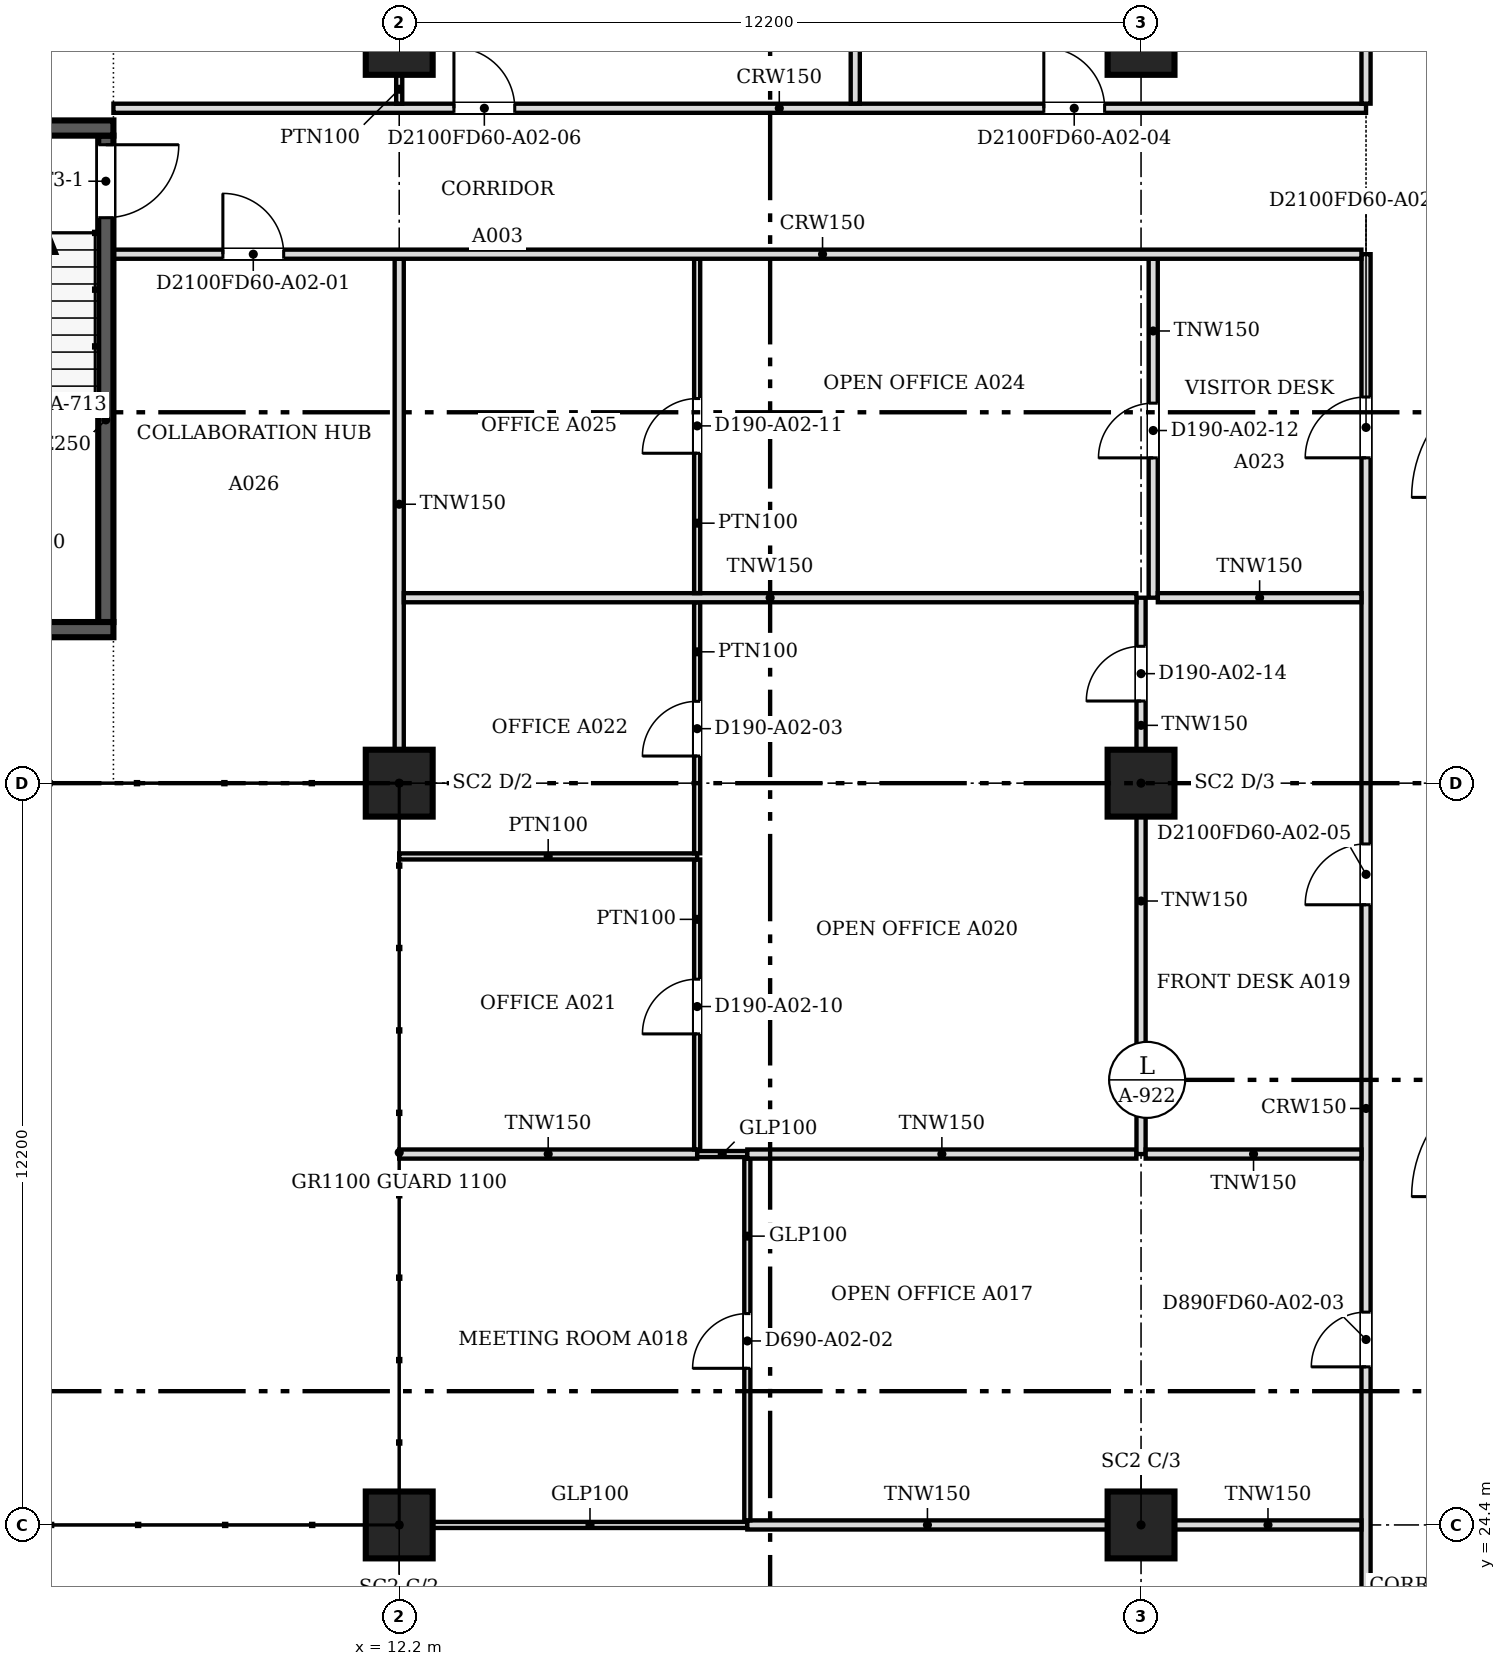
"""IFC4 building model, lengths in metres.
Left out: names, types, materials, properties, quantities, classifications, styles, units other than length and angle.
Written with IfcOpenShell. Run it as: python <this file> out.ifc"""

import sys

from ifc_helpers import new_model, si_unit, direction, frame, frame_2d, origin, origin_2d, place, context, subcontext, project, spatial, rectangle, extrude, source, transform, mapped, element, fill, save


model = new_model("IFC4")
c1 = context("Model", 3, precision=1e-05, world=origin(), true_north=direction((0.0, 1.0)))
c2 = subcontext(c1, "Body", "Model", "MODEL_VIEW")
j1 = project(units=[si_unit("LENGTHUNIT", "METRE"), si_unit("PLANEANGLEUNIT", "RADIAN")], contexts=[c1])
p1 = place(None, origin())
s1 = spatial("IfcSite", under=j1, at=p1, CompositionType="ELEMENT")
p2 = place(p1, origin())
s2 = spatial("IfcBuilding", under=s1, at=p2, CompositionType="ELEMENT")
p3 = place(p2, frame((0.0, 0.0, 33.4)))
s3 = spatial("IfcBuildingStorey", under=s2, at=p3, CompositionType="ELEMENT", Elevation=33.4)
for number, where, z_axis, x_axis in (
    (1, (12.2, 24.4, 0.0), (0.0, 0.0, 1.0), (1.0, 0.0, 0.0)),
    (2, (12.2, 36.6, 0.0), (0.0, 0.0, 1.0), (1.0, 0.0, 0.0)),
    (3, (12.2, 48.8, 0.0), (0.0, 0.0, 1.0), (1.0, 0.0, 0.0)),
    (4, (24.4, 24.4, 0.0), (0.0, 0.0, 1.0), (1.0, 0.0, 0.0)),
    (5, (24.4, 36.6, 0.0), (0.0, 0.0, 1.0), (1.0, 0.0, 0.0)),
    (6, (24.4, 48.8, 0.0), (0.0, 0.0, 1.0), (1.0, 0.0, 0.0)),
):
    element("IfcColumn", number, at=place(p3, frame(where, z_axis=z_axis, x_axis=x_axis)), inside=s3, PredefinedType="COLUMN", context=c2, shape_type="SweptSolid", body=[
        extrude(rectangle(XDim=1.1, YDim=1.1, at=origin_2d()), origin(), (0.0, 0.0, 1.0), 3.6),
    ])
for number, where, z_axis, x_axis in (
    (7, (7.5, 39.125, 0.0), (0.0, 0.0, 1.0), (-1.0, 0.0, 0.0)),
    (8, (3.6, 47.375, 0.0), (0.0, 0.0, 1.0), (1.0, 0.0, 0.0)),
):
    element("IfcWall", number, at=place(p3, frame(where, z_axis=z_axis, x_axis=x_axis)), inside=s3, PredefinedType="SOLIDWALL", context=c2, shape_type="SweptSolid", body=[
        extrude(rectangle(XDim=3.9, YDim=0.25, at=frame_2d((1.95, 0.0))), origin(), (0.0, 0.0, 1.0), 3.8),
    ])
p4 = place(p3, frame((7.375, 47.25, 0.0), z_axis=(0.0, 0.0, 1.0), x_axis=(0.0, -1.0, 0.0)))
e9 = element("IfcWall", 9, at=p4, inside=s3, PredefinedType="SOLIDWALL", context=c2, shape_type="SweptSolid", body=[
    extrude(rectangle(XDim=8.0, YDim=0.25, at=frame_2d((4.0, 0.0))), origin(), (0.0, 0.0, 1.0), 3.8),
])
m1 = source(origin(), c2, "Body", "SweptSolid", [
    extrude(rectangle(XDim=1.2, YDim=2.1, at=frame_2d((0.6, 1.05))), frame((0.0, 0.135, 0.0), z_axis=(0.0, -1.0, 0.0), x_axis=(1.0, 0.0, 0.0)), (0.0, 0.0, 1.0), 0.27),
])
p5 = place(p4, frame((0.15, 0.0, 0.0)))
e10 = element("IfcOpeningElement", 10, at=p5, cuts=e9, PredefinedType="OPENING", context=c2, shape_type="MappedRepresentation", body=[
    mapped(m1, transform((0.0, 0.0, 0.0), scale=1.0)),
])
p6 = place(p3, frame((28.1, 18.8, 0.0), z_axis=(0.0, 0.0, 1.0), x_axis=(0.0, 1.0, 0.0)))
e11 = element("IfcWall", 11, at=p6, inside=s3, PredefinedType="PARTITIONING", context=c2, shape_type="SweptSolid", body=[
    extrude(rectangle(XDim=26.5, YDim=0.15, at=frame_2d((13.25, 0.0))), origin(), (0.0, 0.0, 1.0), 3.067),
])
m2 = source(origin(), c2, "Body", "SweptSolid", [
    extrude(rectangle(XDim=0.9, YDim=2.1, at=frame_2d((0.45, 1.05))), frame((0.0, 0.085, 0.0), z_axis=(0.0, -1.0, 0.0), x_axis=(1.0, 0.0, 0.0)), (0.0, 0.0, 1.0), 0.17),
])
p7 = place(p6, frame((1.1, 0.0, 0.0)))
e12 = element("IfcOpeningElement", 12, at=p7, cuts=e11, PredefinedType="OPENING", context=c2, shape_type="MappedRepresentation", body=[
    mapped(m2, transform((0.0, 0.0, 0.0), scale=1.0)),
])
m3 = source(origin(), c2, "Body", "SweptSolid", [
    extrude(rectangle(XDim=1.0, YDim=2.1, at=frame_2d((0.5, 1.05))), frame((0.0, 0.085, 0.0), z_axis=(0.0, -1.0, 0.0), x_axis=(1.0, 0.0, 0.0)), (0.0, 0.0, 1.0), 0.17),
])
p8 = place(p6, frame((23.151, 0.0, 0.0)))
e13 = element("IfcOpeningElement", 13, at=p8, cuts=e11, PredefinedType="OPENING", context=c2, shape_type="MappedRepresentation", body=[
    mapped(m3, transform((0.0, 0.0, 0.0), scale=1.0)),
])
p9 = place(p6, frame((8.2, 0.0, 0.0)))
e14 = element("IfcOpeningElement", 14, at=p9, cuts=e11, PredefinedType="OPENING", context=c2, shape_type="MappedRepresentation", body=[
    mapped(m2, transform((0.0, 0.0, 0.0), scale=1.0)),
])
p10 = place(p6, frame((15.8, 0.0, 0.0)))
e15 = element("IfcOpeningElement", 15, at=p10, cuts=e11, PredefinedType="OPENING", context=c2, shape_type="MappedRepresentation", body=[
    mapped(m3, transform((0.0, 0.0, 0.0), scale=1.0)),
])
p11 = place(p3, frame((12.751, 24.4, 0.0), z_axis=(0.0, 0.0, 1.0), x_axis=(1.0, 0.0, 0.0)))
e16 = element("IfcWall", 16, at=p11, inside=s3, PredefinedType="PARTITIONING", context=c2, shape_type="SweptSolid", body=[
    extrude(rectangle(XDim=5.173, YDim=0.1, at=frame_2d((2.586, 0.0))), origin(), (0.0, 0.0, 1.0), 3.067),
])
p12 = place(p3, frame((17.925, 24.4, 0.0), z_axis=(0.0, 0.0, 1.0), x_axis=(1.0, 0.0, 0.0)))
e17 = element("IfcWall", 17, at=p12, inside=s3, PredefinedType="PARTITIONING", context=c2, shape_type="SweptSolid", body=[
    extrude(rectangle(XDim=5.924, YDim=0.15, at=frame_2d((2.962, 0.0))), origin(), (0.0, 0.0, 1.0), 3.067),
])
p13 = place(p3, frame((24.951, 24.4, 0.0), z_axis=(0.0, 0.0, 1.0), x_axis=(1.0, 0.0, 0.0)))
e18 = element("IfcWall", 18, at=p13, inside=s3, PredefinedType="PARTITIONING", context=c2, shape_type="SweptSolid", body=[
    extrude(rectangle(XDim=3.073, YDim=0.15, at=frame_2d((1.537, 0.0))), origin(), (0.0, 0.0, 1.0), 3.067),
])
p14 = place(p3, frame((17.925, 24.476, 0.0), z_axis=(0.0, 0.0, 1.0), x_axis=(0.0, 1.0, 0.0)))
e19 = element("IfcWall", 19, at=p14, inside=s3, PredefinedType="PARTITIONING", context=c2, shape_type="SweptSolid", body=[
    extrude(rectangle(XDim=5.948, YDim=0.1, at=frame_2d((2.974, 0.0))), origin(), (0.0, 0.0, 1.0), 3.067),
])
m4 = source(origin(), c2, "Body", "SweptSolid", [
    extrude(rectangle(XDim=0.9, YDim=2.1, at=frame_2d((0.45, 1.05))), frame((0.0, 0.06, 0.0), z_axis=(0.0, -1.0, 0.0), x_axis=(1.0, 0.0, 0.0)), (0.0, 0.0, 1.0), 0.12),
])
p15 = place(p14, frame((2.5, 0.0, 0.0)))
e20 = element("IfcOpeningElement", 20, at=p15, cuts=e19, PredefinedType="OPENING", context=c2, shape_type="MappedRepresentation", body=[
    mapped(m4, transform((0.0, 0.0, 0.0), scale=1.0)),
])
p16 = place(p3, frame((12.2, 30.5, 0.0), z_axis=(0.0, 0.0, 1.0), x_axis=(1.0, 0.0, 0.0)))
e21 = element("IfcWall", 21, at=p16, inside=s3, PredefinedType="PARTITIONING", context=c2, shape_type="SweptSolid", body=[
    extrude(rectangle(XDim=4.9, YDim=0.15, at=frame_2d((2.45, 0.0))), origin(), (0.0, 0.0, 1.0), 3.067),
])
p17 = place(p3, frame((17.101, 30.5, 0.0), z_axis=(0.0, 0.0, 1.0), x_axis=(1.0, 0.0, 0.0)))
e22 = element("IfcWall", 22, at=p17, inside=s3, PredefinedType="PARTITIONING", context=c2, shape_type="SweptSolid", body=[
    extrude(rectangle(XDim=0.823, YDim=0.1, at=frame_2d((0.412, 0.0))), origin(), (0.0, 0.0, 1.0), 3.067),
])
p18 = place(p3, frame((17.925, 30.5, 0.0), z_axis=(0.0, 0.0, 1.0), x_axis=(1.0, 0.0, 0.0)))
e23 = element("IfcWall", 23, at=p18, inside=s3, PredefinedType="PARTITIONING", context=c2, shape_type="SweptSolid", body=[
    extrude(rectangle(XDim=6.399, YDim=0.15, at=frame_2d((3.199, 0.0))), origin(), (0.0, 0.0, 1.0), 3.067),
])
p19 = place(p3, frame((24.4, 30.5, 0.0), z_axis=(0.0, 0.0, 1.0), x_axis=(0.0, 1.0, 0.0)))
e24 = element("IfcWall", 24, at=p19, inside=s3, PredefinedType="PARTITIONING", context=c2, shape_type="SweptSolid", body=[
    extrude(rectangle(XDim=5.549, YDim=0.15, at=frame_2d((2.774, 0.0))), origin(), (0.0, 0.0, 1.0), 3.067),
])
p20 = place(p3, frame((24.476, 30.5, 0.0), z_axis=(0.0, 0.0, 1.0), x_axis=(1.0, 0.0, 0.0)))
e25 = element("IfcWall", 25, at=p20, inside=s3, PredefinedType="PARTITIONING", context=c2, shape_type="SweptSolid", body=[
    extrude(rectangle(XDim=3.548, YDim=0.15, at=frame_2d((1.774, 0.0))), origin(), (0.0, 0.0, 1.0), 3.067),
])
p21 = place(p3, frame((17.1, 30.576, 0.0), z_axis=(0.0, 0.0, 1.0), x_axis=(0.0, 1.0, 0.0)))
e26 = element("IfcWall", 26, at=p21, inside=s3, PredefinedType="PARTITIONING", context=c2, shape_type="SweptSolid", body=[
    extrude(rectangle(XDim=4.768, YDim=0.1, at=frame_2d((2.384, 0.0))), origin(), (0.0, 0.0, 1.0), 3.067),
])
p22 = place(p21, frame((1.9, 0.0, 0.0)))
e27 = element("IfcOpeningElement", 27, at=p22, cuts=e26, PredefinedType="OPENING", context=c2, shape_type="MappedRepresentation", body=[
    mapped(m4, transform((0.0, 0.0, 0.0), scale=1.0)),
])
p23 = place(p3, frame((12.2, 35.395, 0.0), z_axis=(0.0, 0.0, 1.0), x_axis=(1.0, 0.0, 0.0)))
e28 = element("IfcWall", 28, at=p23, inside=s3, PredefinedType="PARTITIONING", context=c2, shape_type="SweptSolid", body=[
    extrude(rectangle(XDim=4.9, YDim=0.1, at=frame_2d((2.45, 0.0))), origin(), (0.0, 0.0, 1.0), 3.067),
])
p24 = place(p3, frame((17.1, 35.446, 0.0), z_axis=(0.0, 0.0, 1.0), x_axis=(0.0, 1.0, 0.0)))
e29 = element("IfcWall", 29, at=p24, inside=s3, PredefinedType="PARTITIONING", context=c2, shape_type="SweptSolid", body=[
    extrude(rectangle(XDim=4.128, YDim=0.1, at=frame_2d((2.064, 0.0))), origin(), (0.0, 0.0, 1.0), 3.067),
])
p25 = place(p24, frame((1.6, 0.0, 0.0)))
e30 = element("IfcOpeningElement", 30, at=p25, cuts=e29, PredefinedType="OPENING", context=c2, shape_type="MappedRepresentation", body=[
    mapped(m4, transform((0.0, 0.0, 0.0), scale=1.0)),
])
p26 = place(p3, frame((12.2, 37.151, 0.0), z_axis=(0.0, 0.0, 1.0), x_axis=(0.0, 1.0, 0.0)))
e31 = element("IfcWall", 31, at=p26, inside=s3, PredefinedType="PARTITIONING", context=c2, shape_type="SweptSolid", body=[
    extrude(rectangle(XDim=8.073, YDim=0.15, at=frame_2d((4.037, 0.0))), origin(), (0.0, 0.0, 1.0), 3.067),
])
p27 = place(p3, frame((24.4, 37.151, 0.0), z_axis=(0.0, 0.0, 1.0), x_axis=(0.0, 1.0, 0.0)))
e32 = element("IfcWall", 32, at=p27, inside=s3, PredefinedType="PARTITIONING", context=c2, shape_type="SweptSolid", body=[
    extrude(rectangle(XDim=2.499, YDim=0.15, at=frame_2d((1.25, 0.0))), origin(), (0.0, 0.0, 1.0), 3.067),
])
p28 = place(p27, frame((0.8, 0.0, 0.0)))
e33 = element("IfcOpeningElement", 33, at=p28, cuts=e32, PredefinedType="OPENING", context=c2, shape_type="MappedRepresentation", body=[
    mapped(m2, transform((0.0, 0.0, 0.0), scale=1.0)),
])
p29 = place(p3, frame((12.276, 39.65, 0.0), z_axis=(0.0, 0.0, 1.0), x_axis=(1.0, 0.0, 0.0)))
e34 = element("IfcWall", 34, at=p29, inside=s3, PredefinedType="PARTITIONING", context=c2, shape_type="SweptSolid", body=[
    extrude(rectangle(XDim=12.048, YDim=0.15, at=frame_2d((6.024, 0.0))), origin(), (0.0, 0.0, 1.0), 3.067),
])
p30 = place(p3, frame((24.6, 39.65, 0.0), z_axis=(0.0, 0.0, 1.0), x_axis=(0.0, 1.0, 0.0)))
e35 = element("IfcWall", 35, at=p30, inside=s3, PredefinedType="PARTITIONING", context=c2, shape_type="SweptSolid", body=[
    extrude(rectangle(XDim=5.574, YDim=0.15, at=frame_2d((2.787, 0.0))), origin(), (0.0, 0.0, 1.0), 3.067),
])
p31 = place(p30, frame((2.3, 0.0, 0.0)))
e36 = element("IfcOpeningElement", 36, at=p31, cuts=e35, PredefinedType="OPENING", context=c2, shape_type="MappedRepresentation", body=[
    mapped(m2, transform((0.0, 0.0, 0.0), scale=1.0)),
])
p32 = place(p3, frame((24.676, 39.65, 0.0), z_axis=(0.0, 0.0, 1.0), x_axis=(1.0, 0.0, 0.0)))
e37 = element("IfcWall", 37, at=p32, inside=s3, PredefinedType="PARTITIONING", context=c2, shape_type="SweptSolid", body=[
    extrude(rectangle(XDim=3.348, YDim=0.15, at=frame_2d((1.674, 0.0))), origin(), (0.0, 0.0, 1.0), 3.067),
])
p33 = place(p3, frame((17.1, 39.726, 0.0), z_axis=(0.0, 0.0, 1.0), x_axis=(0.0, 1.0, 0.0)))
e38 = element("IfcWall", 38, at=p33, inside=s3, PredefinedType="PARTITIONING", context=c2, shape_type="SweptSolid", body=[
    extrude(rectangle(XDim=5.498, YDim=0.1, at=frame_2d((2.749, 0.0))), origin(), (0.0, 0.0, 1.0), 3.067),
])
p34 = place(p33, frame((2.3, 0.0, 0.0)))
e39 = element("IfcOpeningElement", 39, at=p34, cuts=e38, PredefinedType="OPENING", context=c2, shape_type="MappedRepresentation", body=[
    mapped(m4, transform((0.0, 0.0, 0.0), scale=1.0)),
])
p35 = place(p3, frame((28.024, 45.3, 0.0), z_axis=(0.0, 0.0, 1.0), x_axis=(-1.0, 0.0, 0.0)))
e40 = element("IfcWall", 40, at=p35, inside=s3, PredefinedType="PARTITIONING", context=c2, shape_type="SweptSolid", body=[
    extrude(rectangle(XDim=20.524, YDim=0.15, at=frame_2d((10.262, 0.0))), origin(), (0.0, 0.0, 1.0), 3.067),
])
p36 = place(p35, frame((17.724, 0.0, 0.0)))
e41 = element("IfcOpeningElement", 41, at=p36, cuts=e40, PredefinedType="OPENING", context=c2, shape_type="MappedRepresentation", body=[
    mapped(m3, transform((0.0, 0.0, 0.0), scale=1.0)),
])
p37 = place(p3, frame((7.5, 47.7, 0.0), z_axis=(0.0, 0.0, 1.0), x_axis=(1.0, 0.0, 0.0)))
e42 = element("IfcWall", 42, at=p37, inside=s3, PredefinedType="PARTITIONING", context=c2, shape_type="SweptSolid", body=[
    extrude(rectangle(XDim=20.6, YDim=0.15, at=frame_2d((10.3, 0.0))), origin(), (0.0, 0.0, 1.0), 3.067),
])
p38 = place(p37, frame((15.301, 0.0, 0.0)))
e43 = element("IfcOpeningElement", 43, at=p38, cuts=e42, PredefinedType="OPENING", context=c2, shape_type="MappedRepresentation", body=[
    mapped(m3, transform((0.0, 0.0, 0.0), scale=1.0)),
])
p39 = place(p37, frame((5.6, 0.0, 0.0)))
e44 = element("IfcOpeningElement", 44, at=p39, cuts=e42, PredefinedType="OPENING", context=c2, shape_type="MappedRepresentation", body=[
    mapped(m3, transform((0.0, 0.0, 0.0), scale=1.0)),
])
p40 = place(p3, frame((19.7, 47.776, 0.0), z_axis=(0.0, 0.0, 1.0), x_axis=(0.0, 1.0, 0.0)))
e45 = element("IfcWall", 45, at=p40, inside=s3, PredefinedType="PARTITIONING", context=c2, shape_type="SweptSolid", body=[
    extrude(rectangle(XDim=3.198, YDim=0.15, at=frame_2d((1.599, 0.0))), origin(), (0.0, 0.0, 1.0), 3.067),
])
p41 = place(p3, frame((28.1, 47.776, 0.0), z_axis=(0.0, 0.0, 1.0), x_axis=(0.0, 1.0, 0.0)))
e46 = element("IfcWall", 46, at=p41, inside=s3, PredefinedType="PARTITIONING", context=c2, shape_type="SweptSolid", body=[
    extrude(rectangle(XDim=3.274, YDim=0.15, at=frame_2d((1.637, 0.0))), origin(), (0.0, 0.0, 1.0), 3.067),
])
p42 = place(p3, frame((12.2, 48.25, 0.0), z_axis=(0.0, 0.0, 1.0), x_axis=(0.0, -1.0, 0.0)))
e47 = element("IfcWall", 47, at=p42, inside=s3, PredefinedType="PARTITIONING", context=c2, shape_type="SweptSolid", body=[
    extrude(rectangle(XDim=0.475, YDim=0.1, at=frame_2d((0.238, 0.0))), origin(), (0.0, 0.0, 1.0), 3.067),
])
m5 = source(origin(), c2, "Body", "SweptSolid", [
    extrude(rectangle(XDim=1.2, YDim=2.1, at=frame_2d((0.6, 1.05))), frame((0.0, 0.025, 0.0), z_axis=(0.0, -1.0, 0.0), x_axis=(1.0, 0.0, 0.0)), (0.0, 0.0, 1.0), 0.05),
])
p43 = place(p5, origin())
e48 = element("IfcDoor", 48, at=p43, inside=s3, OperationType="SINGLE_SWING_LEFT", PredefinedType="DOOR", context=c2, shape_type="MappedRepresentation", body=[
    mapped(m5, transform((0.0, 0.0, 0.0), scale=1.0)),
])
fill(e10, e48)
m6 = source(origin(), c2, "Body", "SweptSolid", [
    extrude(rectangle(XDim=0.9, YDim=2.1, at=frame_2d((0.45, 1.05))), frame((0.0, 0.025, 0.0), z_axis=(0.0, -1.0, 0.0), x_axis=(1.0, 0.0, 0.0)), (0.0, 0.0, 1.0), 0.05),
])
p44 = place(p25, origin())
e49 = element("IfcDoor", 49, at=p44, inside=s3, OperationType="SINGLE_SWING_LEFT", PredefinedType="DOOR", context=c2, shape_type="MappedRepresentation", body=[
    mapped(m6, transform((0.0, 0.0, 0.0), scale=1.0)),
])
fill(e30, e49)
m7 = source(origin(), c2, "Body", "SweptSolid", [
    extrude(rectangle(XDim=1.0, YDim=2.1, at=frame_2d((0.5, 1.05))), frame((0.0, 0.025, 0.0), z_axis=(0.0, -1.0, 0.0), x_axis=(1.0, 0.0, 0.0)), (0.0, 0.0, 1.0), 0.05),
])
p45 = place(p36, origin())
e50 = element("IfcDoor", 50, at=p45, inside=s3, OperationType="SINGLE_SWING_RIGHT", PredefinedType="DOOR", context=c2, shape_type="MappedRepresentation", body=[
    mapped(m7, transform((0.0, 0.0, 0.0), scale=1.0)),
])
fill(e41, e50)
p46 = place(p22, origin())
e51 = element("IfcDoor", 51, at=p46, inside=s3, OperationType="SINGLE_SWING_LEFT", PredefinedType="DOOR", context=c2, shape_type="MappedRepresentation", body=[
    mapped(m6, transform((0.0, 0.0, 0.0), scale=1.0)),
])
fill(e27, e51)
p47 = place(p34, origin())
e52 = element("IfcDoor", 52, at=p47, inside=s3, OperationType="SINGLE_SWING_LEFT", PredefinedType="DOOR", context=c2, shape_type="MappedRepresentation", body=[
    mapped(m6, transform((0.0, 0.0, 0.0), scale=1.0)),
])
fill(e39, e52)
p48 = place(p31, origin())
e53 = element("IfcDoor", 53, at=p48, inside=s3, OperationType="SINGLE_SWING_LEFT", PredefinedType="DOOR", context=c2, shape_type="MappedRepresentation", body=[
    mapped(m6, transform((0.0, 0.0, 0.0), scale=1.0)),
])
fill(e36, e53)
p49 = place(p8, origin())
e54 = element("IfcDoor", 54, at=p49, inside=s3, OperationType="SINGLE_SWING_LEFT", PredefinedType="DOOR", context=c2, shape_type="MappedRepresentation", body=[
    mapped(m7, transform((0.0, 0.0, 0.0), scale=1.0)),
])
fill(e13, e54)
p50 = place(p15, origin())
e55 = element("IfcDoor", 55, at=p50, inside=s3, OperationType="SINGLE_SWING_LEFT", PredefinedType="DOOR", context=c2, shape_type="MappedRepresentation", body=[
    mapped(m6, transform((0.0, 0.0, 0.0), scale=1.0)),
])
fill(e20, e55)
p51 = place(p9, origin())
e56 = element("IfcDoor", 56, at=p51, inside=s3, OperationType="SINGLE_SWING_LEFT", PredefinedType="DOOR", context=c2, shape_type="MappedRepresentation", body=[
    mapped(m6, transform((0.0, 0.0, 0.0), scale=1.0)),
])
fill(e14, e56)
p52 = place(p28, origin())
e57 = element("IfcDoor", 57, at=p52, inside=s3, OperationType="SINGLE_SWING_LEFT", PredefinedType="DOOR", context=c2, shape_type="MappedRepresentation", body=[
    mapped(m6, transform((0.0, 0.0, 0.0), scale=1.0)),
])
fill(e33, e57)
p53 = place(p38, origin())
e58 = element("IfcDoor", 58, at=p53, inside=s3, OperationType="SINGLE_SWING_LEFT", PredefinedType="DOOR", context=c2, shape_type="MappedRepresentation", body=[
    mapped(m7, transform((0.0, 0.0, 0.0), scale=1.0)),
])
fill(e43, e58)
p54 = place(p10, origin())
e59 = element("IfcDoor", 59, at=p54, inside=s3, OperationType="SINGLE_SWING_LEFT", PredefinedType="DOOR", context=c2, shape_type="MappedRepresentation", body=[
    mapped(m7, transform((0.0, 0.0, 0.0), scale=1.0)),
])
fill(e15, e59)
p55 = place(p39, origin())
e60 = element("IfcDoor", 60, at=p55, inside=s3, OperationType="SINGLE_SWING_LEFT", PredefinedType="DOOR", context=c2, shape_type="MappedRepresentation", body=[
    mapped(m7, transform((0.0, 0.0, 0.0), scale=1.0)),
])
fill(e44, e60)
save(model, sys.argv[1])
